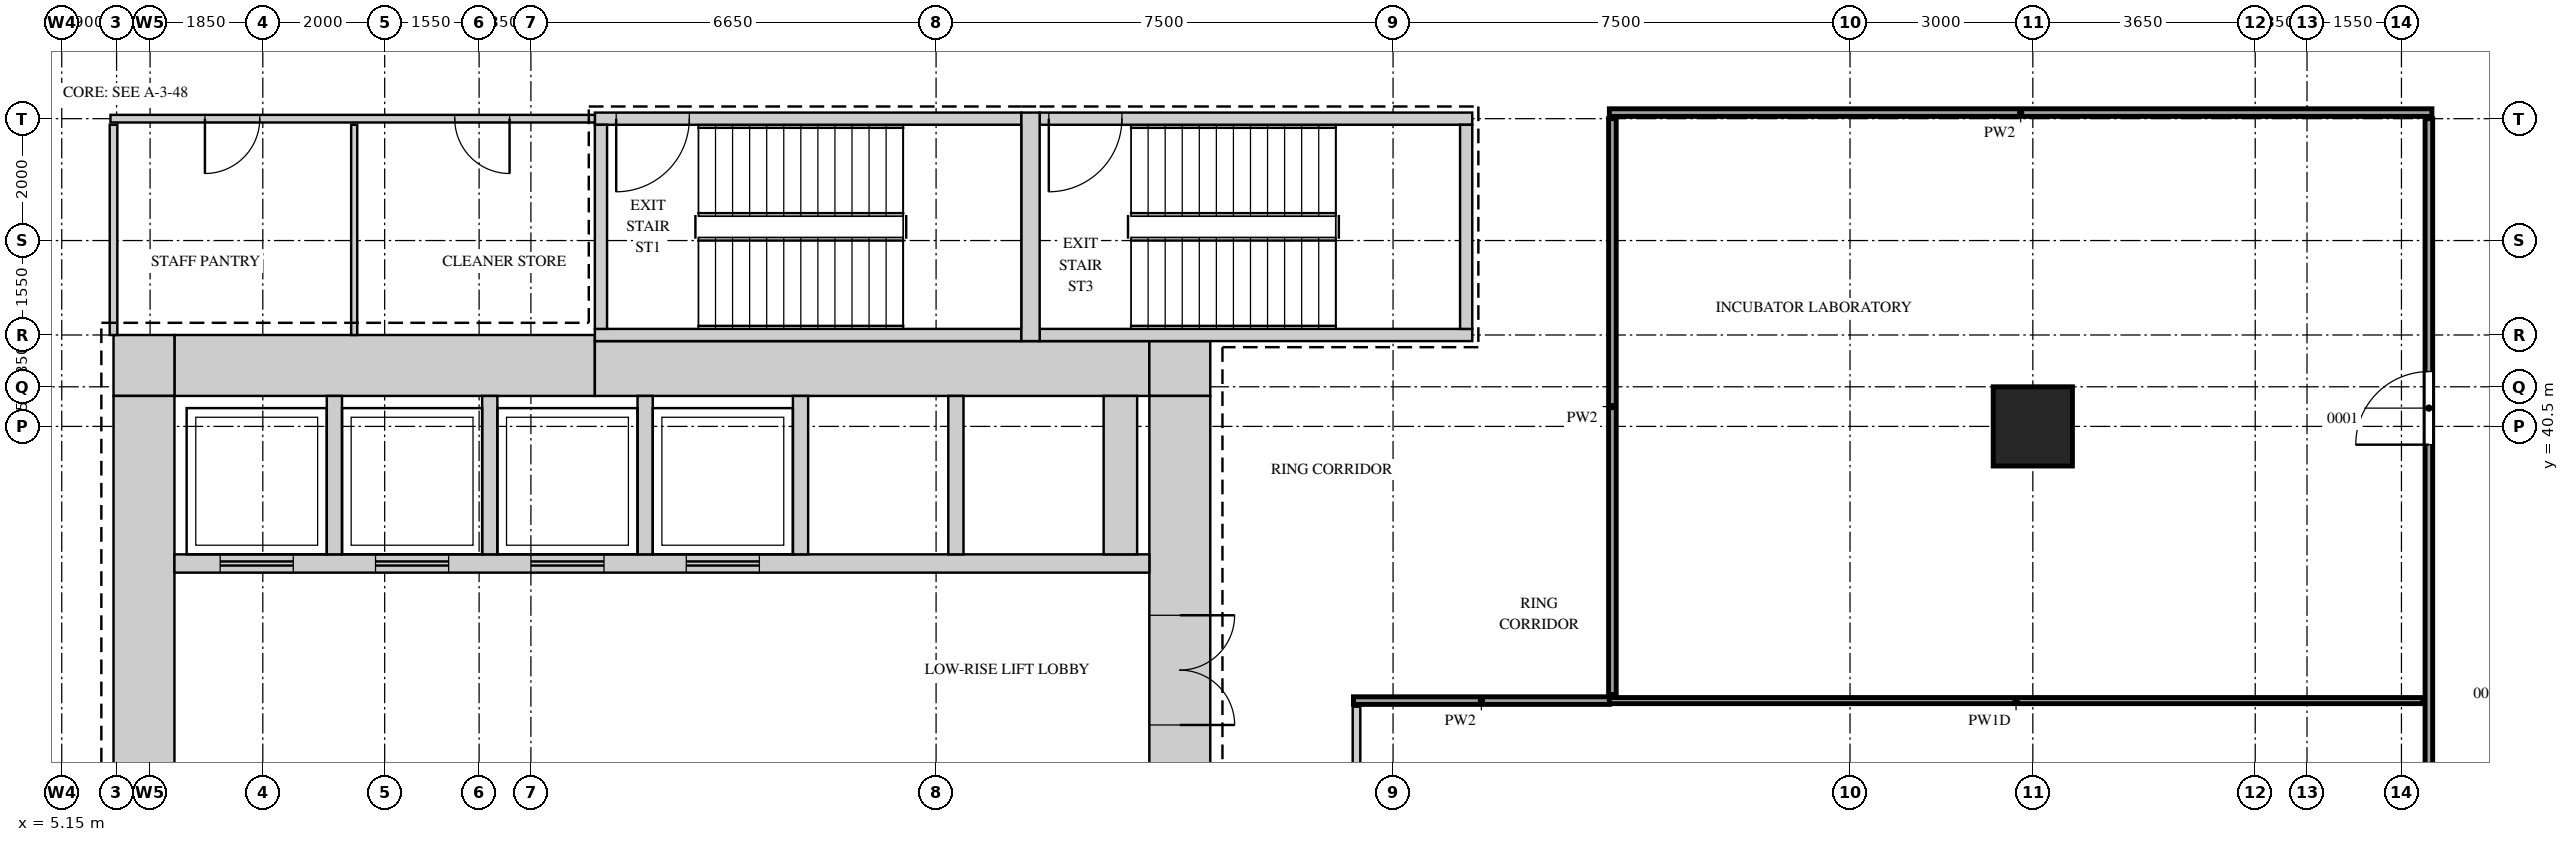
"""IFC4 building model, lengths in metres.
Left out: names, types, materials, properties, quantities, classifications, styles, units other than length and angle.
Written with IfcOpenShell. Run it as: python <this file> out.ifc"""

import sys

from ifc_helpers import new_model, si_unit, direction, frame, frame_2d, origin, origin_2d, place, context, subcontext, project, spatial, rectangle, extrude, source, transform, mapped, element, fill, save


model = new_model("IFC4")
c1 = context("Model", 3, precision=1e-05, world=origin(), true_north=direction((0.0, 1.0)))
c2 = subcontext(c1, "Body", "Model", "MODEL_VIEW")
j1 = project(units=[si_unit("LENGTHUNIT", "METRE"), si_unit("PLANEANGLEUNIT", "RADIAN")], contexts=[c1])
p1 = place(None, origin())
s1 = spatial("IfcSite", under=j1, at=p1, CompositionType="ELEMENT")
p2 = place(p1, origin())
s2 = spatial("IfcBuilding", under=s1, at=p2, CompositionType="ELEMENT")
p3 = place(p2, frame((0.0, 0.0, 154.3)))
s3 = spatial("IfcBuildingStorey", under=s2, at=p3, CompositionType="ELEMENT", Elevation=154.3)
m1 = source(origin(), c2, "Body", "SweptSolid", [
    extrude(rectangle(XDim=6.9, YDim=1.0, at=frame_2d((3.45, 0.0))), origin(), (0.0, 0.0, 1.0), 4.1),
])
p4 = place(p3, frame((7.0, 41.5, 0.0), z_axis=(0.0, 0.0, 1.0), x_axis=(1.0, 0.0, 0.0)))
e1 = element("IfcWall", 1, at=p4, inside=s3, PredefinedType="SHEAR", context=c2, shape_type="MappedRepresentation", body=[
    mapped(m1, transform((0.0, 0.0, 0.0))),
])
m2 = source(origin(), c2, "Body", "SweptSolid", [
    extrude(rectangle(XDim=9.1, YDim=0.9, at=frame_2d((4.55, 0.0))), origin(), (0.0, 0.0, 1.0), 4.1),
])
p5 = place(p3, frame((13.9, 41.45, 0.0), z_axis=(0.0, 0.0, 1.0), x_axis=(1.0, 0.0, 0.0)))
e2 = element("IfcWall", 2, at=p5, inside=s3, PredefinedType="SHEAR", context=c2, shape_type="MappedRepresentation", body=[
    mapped(m2, transform((0.0, 0.0, 0.0))),
])
m3 = source(origin(), c2, "Body", "SweptSolid", [
    extrude(rectangle(XDim=1.0, YDim=0.9, at=frame_2d((0.5, 0.0))), origin(), (0.0, 0.0, 1.0), 4.1),
])
p6 = place(p3, frame((23.0, 41.45, 0.0), z_axis=(0.0, 0.0, 1.0), x_axis=(1.0, 0.0, 0.0)))
e3 = element("IfcWall", 3, at=p6, inside=s3, PredefinedType="SHEAR", context=c2, shape_type="MappedRepresentation", body=[
    mapped(m3, transform((0.0, 0.0, 0.0))),
])
m4 = source(origin(), c2, "Body", "SweptSolid", [
    extrude(rectangle(XDim=1.0, YDim=1.0, at=frame_2d((0.5, 0.0))), origin(), (0.0, 0.0, 1.0), 4.1),
])
p7 = place(p3, frame((6.0, 41.5, 0.0), z_axis=(0.0, 0.0, 1.0), x_axis=(1.0, 0.0, 0.0)))
e4 = element("IfcWall", 4, at=p7, inside=s3, PredefinedType="SHEAR", context=c2, shape_type="MappedRepresentation", body=[
    mapped(m4, transform((0.0, 0.0, 0.0))),
])
m5 = source(origin(), c2, "Body", "SweptSolid", [
    extrude(rectangle(XDim=28.0, YDim=1.0, at=frame_2d((14.0, 0.0))), origin(), (0.0, 0.0, 1.0), 4.1),
])
p8 = place(p3, frame((23.5, 13.0, 0.0), z_axis=(0.0, 0.0, 1.0), x_axis=(0.0, 1.0, 0.0)))
e5 = element("IfcWall", 5, at=p8, inside=s3, PredefinedType="SHEAR", context=c2, shape_type="MappedRepresentation", body=[
    mapped(m5, transform((0.0, 0.0, 0.0))),
])
m6 = source(origin(), c2, "Body", "SweptSolid", [
    extrude(rectangle(XDim=1.8, YDim=2.1, at=frame_2d((0.9, 1.05))), frame((0.0, 0.51, 0.0), z_axis=(0.0, -1.0, 0.0), x_axis=(1.0, 0.0, 0.0)), (0.0, 0.0, 1.0), 1.02),
])
p9 = place(p8, frame((22.6, 0.0, 0.0)))
e6 = element("IfcOpeningElement", 6, at=p9, cuts=e5, PredefinedType="OPENING", context=c2, shape_type="MappedRepresentation", body=[
    mapped(m6, transform((0.0, 0.0, 0.0))),
])
m7 = source(origin(), c2, "Body", "SweptSolid", [
    extrude(rectangle(XDim=1.2, YDim=2.1, at=frame_2d((0.6, 1.05))), frame((0.0, 0.51, 0.0), z_axis=(0.0, -1.0, 0.0), x_axis=(1.0, 0.0, 0.0)), (0.0, 0.0, 1.0), 1.02),
])
p10 = place(p8, frame((14.6, 0.0, 0.0)))
e7 = element("IfcOpeningElement", 7, at=p10, cuts=e5, PredefinedType="OPENING", context=c2, shape_type="MappedRepresentation", body=[
    mapped(m7, transform((0.0, 0.0, 0.0))),
])
m8 = source(origin(), c2, "Body", "SweptSolid", [
    extrude(rectangle(XDim=0.9, YDim=2.1, at=frame_2d((0.45, 1.05))), frame((0.0, 0.51, 0.0), z_axis=(0.0, -1.0, 0.0), x_axis=(1.0, 0.0, 0.0)), (0.0, 0.0, 1.0), 1.02),
])
p11 = place(p8, frame((1.35, 0.0, 0.0)))
e8 = element("IfcOpeningElement", 8, at=p11, cuts=e5, PredefinedType="OPENING", context=c2, shape_type="MappedRepresentation", body=[
    mapped(m8, transform((0.0, 0.0, 0.0))),
])
p12 = place(p8, frame((6.2, 0.0, 0.0)))
e9 = element("IfcOpeningElement", 9, at=p12, cuts=e5, PredefinedType="OPENING", context=c2, shape_type="MappedRepresentation", body=[
    mapped(m8, transform((0.0, 0.0, 0.0))),
])
p13 = place(p3, frame((6.5, 13.0, 0.0), z_axis=(0.0, 0.0, 1.0), x_axis=(0.0, 1.0, 0.0)))
e10 = element("IfcWall", 10, at=p13, inside=s3, PredefinedType="SHEAR", context=c2, shape_type="MappedRepresentation", body=[
    mapped(m5, transform((0.0, 0.0, 0.0))),
])
m9 = source(origin(), c2, "Body", "SweptSolid", [
    extrude(rectangle(XDim=7.0, YDim=0.2, at=frame_2d((3.5, 0.0))), origin(), (0.0, 0.0, 1.0), 4.1),
])
p14 = place(p3, frame((13.9, 45.55, 0.0), z_axis=(0.0, 0.0, 1.0), x_axis=(1.0, 0.0, 0.0)))
e11 = element("IfcWall", 11, at=p14, inside=s3, PredefinedType="SHEAR", context=c2, shape_type="MappedRepresentation", body=[
    mapped(m9, transform((0.0, 0.0, 0.0))),
])
m10 = source(origin(), c2, "Body", "SweptSolid", [
    extrude(rectangle(XDim=1.2, YDim=2.1, at=frame_2d((0.6, 1.05))), frame((0.0, 0.11, 0.0), z_axis=(0.0, -1.0, 0.0), x_axis=(1.0, 0.0, 0.0)), (0.0, 0.0, 1.0), 0.22),
])
p15 = place(p14, frame((0.35, 0.0, 0.0)))
e12 = element("IfcOpeningElement", 12, at=p15, cuts=e11, PredefinedType="OPENING", context=c2, shape_type="MappedRepresentation", body=[
    mapped(m10, transform((0.0, 0.0, 0.0))),
])
p16 = place(p3, frame((13.9, 42.0, 0.0), z_axis=(0.0, 0.0, 1.0), x_axis=(1.0, 0.0, 0.0)))
e13 = element("IfcWall", 13, at=p16, inside=s3, PredefinedType="SHEAR", context=c2, shape_type="MappedRepresentation", body=[
    mapped(m9, transform((0.0, 0.0, 0.0))),
])
m11 = source(origin(), c2, "Body", "SweptSolid", [
    extrude(rectangle(XDim=7.1, YDim=0.2, at=frame_2d((3.55, 0.0))), origin(), (0.0, 0.0, 1.0), 4.1),
])
p17 = place(p3, frame((21.2, 45.55, 0.0), z_axis=(0.0, 0.0, 1.0), x_axis=(1.0, 0.0, 0.0)))
e14 = element("IfcWall", 14, at=p17, inside=s3, PredefinedType="SHEAR", context=c2, shape_type="MappedRepresentation", body=[
    mapped(m11, transform((0.0, 0.0, 0.0))),
])
p18 = place(p17, frame((0.15, 0.0, 0.0)))
e15 = element("IfcOpeningElement", 15, at=p18, cuts=e14, PredefinedType="OPENING", context=c2, shape_type="MappedRepresentation", body=[
    mapped(m10, transform((0.0, 0.0, 0.0))),
])
p19 = place(p3, frame((21.2, 42.0, 0.0), z_axis=(0.0, 0.0, 1.0), x_axis=(1.0, 0.0, 0.0)))
e16 = element("IfcWall", 16, at=p19, inside=s3, PredefinedType="SHEAR", context=c2, shape_type="MappedRepresentation", body=[
    mapped(m11, transform((0.0, 0.0, 0.0))),
])
m12 = source(origin(), c2, "Body", "SweptSolid", [
    extrude(rectangle(XDim=3.75, YDim=0.3, at=frame_2d((1.875, 0.0))), origin(), (0.0, 0.0, 1.0), 4.1),
])
p20 = place(p3, frame((21.05, 41.9, 0.0), z_axis=(0.0, 0.0, 1.0), x_axis=(0.0, 1.0, 0.0)))
e17 = element("IfcWall", 17, at=p20, inside=s3, PredefinedType="SHEAR", context=c2, shape_type="MappedRepresentation", body=[
    mapped(m12, transform((0.0, 0.0, 0.0))),
])
m13 = source(origin(), c2, "Body", "SweptSolid", [
    extrude(rectangle(XDim=3.35, YDim=0.2, at=frame_2d((1.675, 0.0))), origin(), (0.0, 0.0, 1.0), 4.1),
])
for number, where, z_axis, x_axis in (
    (18, (14.0, 42.1, 0.0), (0.0, 0.0, 1.0), (0.0, 1.0, 0.0)),
    (19, (28.2, 42.1, 0.0), (0.0, 0.0, 1.0), (0.0, 1.0, 0.0)),
):
    element("IfcWall", number, at=place(p3, frame(where, z_axis=z_axis, x_axis=x_axis)), inside=s3, PredefinedType="SHEAR", context=c2, shape_type="MappedRepresentation", body=[
        mapped(m13, transform((0.0, 0.0, 0.0))),
    ])
m14 = source(origin(), c2, "Body", "SweptSolid", [
    extrude(rectangle(XDim=16.0, YDim=0.3, at=frame_2d((8.0, 0.0))), origin(), (0.0, 0.0, 1.0), 4.1),
])
p21 = place(p3, frame((7.0, 38.25, 0.0), z_axis=(0.0, 0.0, 1.0), x_axis=(1.0, 0.0, 0.0)))
e20 = element("IfcWall", 20, at=p21, inside=s3, PredefinedType="STANDARD", context=c2, shape_type="MappedRepresentation", body=[
    mapped(m14, transform((0.0, 0.0, 0.0))),
])
m15 = source(origin(), c2, "Body", "SweptSolid", [
    extrude(rectangle(XDim=1.2, YDim=2.1, at=frame_2d((0.6, 1.05))), frame((0.0, 0.16, 0.0), z_axis=(0.0, -1.0, 0.0), x_axis=(1.0, 0.0, 0.0)), (0.0, 0.0, 1.0), 0.32),
])
p22 = place(p21, frame((0.75, 0.0, 0.0)))
e21 = element("IfcOpeningElement", 21, at=p22, cuts=e20, PredefinedType="OPENING", context=c2, shape_type="MappedRepresentation", body=[
    mapped(m15, transform((0.0, 0.0, 0.0))),
])
p23 = place(p21, frame((3.3, 0.0, 0.0)))
e22 = element("IfcOpeningElement", 22, at=p23, cuts=e20, PredefinedType="OPENING", context=c2, shape_type="MappedRepresentation", body=[
    mapped(m15, transform((0.0, 0.0, 0.0))),
])
p24 = place(p21, frame((5.85, 0.0, 0.0)))
e23 = element("IfcOpeningElement", 23, at=p24, cuts=e20, PredefinedType="OPENING", context=c2, shape_type="MappedRepresentation", body=[
    mapped(m15, transform((0.0, 0.0, 0.0))),
])
p25 = place(p21, frame((8.4, 0.0, 0.0)))
e24 = element("IfcOpeningElement", 24, at=p25, cuts=e20, PredefinedType="OPENING", context=c2, shape_type="MappedRepresentation", body=[
    mapped(m15, transform((0.0, 0.0, 0.0))),
])
m16 = source(origin(), c2, "Body", "SweptSolid", [
    extrude(rectangle(XDim=2.6, YDim=0.25, at=frame_2d((1.3, 0.0))), origin(), (0.0, 0.0, 1.0), 4.1),
])
for number, where, z_axis, x_axis in (
    (25, (9.625, 38.4, 0.0), (0.0, 0.0, 1.0), (0.0, 1.0, 0.0)),
    (26, (12.175, 38.4, 0.0), (0.0, 0.0, 1.0), (0.0, 1.0, 0.0)),
    (27, (14.725, 38.4, 0.0), (0.0, 0.0, 1.0), (0.0, 1.0, 0.0)),
    (28, (17.275, 38.4, 0.0), (0.0, 0.0, 1.0), (0.0, 1.0, 0.0)),
    (29, (19.825, 38.4, 0.0), (0.0, 0.0, 1.0), (0.0, 1.0, 0.0)),
):
    element("IfcWall", number, at=place(p3, frame(where, z_axis=z_axis, x_axis=x_axis)), inside=s3, PredefinedType="STANDARD", context=c2, shape_type="MappedRepresentation", body=[
        mapped(m16, transform((0.0, 0.0, 0.0))),
    ])
m17 = source(origin(), c2, "Body", "SweptSolid", [
    extrude(rectangle(XDim=2.6, YDim=0.55, at=frame_2d((1.3, 0.0))), origin(), (0.0, 0.0, 1.0), 4.1),
])
p26 = place(p3, frame((22.525, 38.4, 0.0), z_axis=(0.0, 0.0, 1.0), x_axis=(0.0, 1.0, 0.0)))
e30 = element("IfcWall", 30, at=p26, inside=s3, PredefinedType="STANDARD", context=c2, shape_type="MappedRepresentation", body=[
    mapped(m17, transform((0.0, 0.0, 0.0))),
])
m18 = source(origin(), c2, "Body", "SweptSolid", [
    extrude(rectangle(XDim=1.3, YDim=1.3, at=origin_2d()), origin(), (0.0, 0.0, 1.0), 4.4),
])
p27 = place(p3, frame((37.5, 40.5, 0.0), z_axis=(0.0, 0.0, 1.0), x_axis=(1.0, 0.0, 0.0)))
e31 = element("IfcColumn", 31, at=p27, inside=s3, PredefinedType="COLUMN", context=c2, shape_type="MappedRepresentation", body=[
    mapped(m18, transform((0.0, 0.0, 0.0))),
])
m19 = source(origin(), c2, "Body", "SweptSolid", [
    extrude(rectangle(XDim=23.2, YDim=0.125, at=frame_2d((11.6, 0.0))), origin(), (0.0, 0.0, 1.0), 4.2),
])
p28 = place(p3, frame((26.4, 12.7, 0.0), z_axis=(0.0, 0.0, 1.0), x_axis=(0.0, 1.0, 0.0)))
e32 = element("IfcWall", 32, at=p28, inside=s3, PredefinedType="PARTITIONING", context=c2, shape_type="MappedRepresentation", body=[
    mapped(m19, transform((0.0, 0.0, 0.0))),
])
m20 = source(origin(), c2, "Body", "SweptSolid", [
    extrude(rectangle(XDim=1.2, YDim=2.1, at=frame_2d((0.6, 1.05))), frame((0.0, 0.073, 0.0), z_axis=(0.0, -1.0, 0.0), x_axis=(1.0, 0.0, 0.0)), (0.0, 0.0, 1.0), 0.145),
])
p29 = place(p28, frame((6.65, 0.0, 0.0)))
e33 = element("IfcOpeningElement", 33, at=p29, cuts=e32, PredefinedType="OPENING", context=c2, shape_type="MappedRepresentation", body=[
    mapped(m20, transform((0.0, 0.0, 0.0))),
])
m21 = source(origin(), c2, "Body", "SweptSolid", [
    extrude(rectangle(XDim=32.85, YDim=0.125, at=frame_2d((16.425, 0.0))), origin(), (0.0, 0.0, 1.0), 4.2),
])
p30 = place(p3, frame((44.0, 12.7, 0.0), z_axis=(0.0, 0.0, 1.0), x_axis=(0.0, 1.0, 0.0)))
e34 = element("IfcWall", 34, at=p30, inside=s3, PredefinedType="PARTITIONING", context=c2, shape_type="MappedRepresentation", body=[
    mapped(m21, transform((0.0, 0.0, 0.0))),
])
p31 = place(p30, frame((18.2, 0.0, 0.0)))
e35 = element("IfcOpeningElement", 35, at=p31, cuts=e34, PredefinedType="OPENING", context=c2, shape_type="MappedRepresentation", body=[
    mapped(m20, transform((0.0, 0.0, 0.0))),
])
p32 = place(p30, frame((27.5, 0.0, 0.0)))
e36 = element("IfcOpeningElement", 36, at=p32, cuts=e34, PredefinedType="OPENING", context=c2, shape_type="MappedRepresentation", body=[
    mapped(m20, transform((0.0, 0.0, 0.0))),
])
m22 = source(origin(), c2, "Body", "SweptSolid", [
    extrude(rectangle(XDim=4.2, YDim=0.125, at=frame_2d((2.1, 0.0))), origin(), (0.0, 0.0, 1.0), 4.2),
])
p33 = place(p3, frame((26.35, 36.0, 0.0), z_axis=(0.0, 0.0, 1.0), x_axis=(1.0, 0.0, 0.0)))
e37 = element("IfcWall", 37, at=p33, inside=s3, PredefinedType="PARTITIONING", context=c2, shape_type="MappedRepresentation", body=[
    mapped(m22, transform((0.0, 0.0, 0.0))),
])
m23 = source(origin(), c2, "Body", "SweptSolid", [
    extrude(rectangle(XDim=13.35, YDim=0.1, at=frame_2d((6.675, 0.0))), origin(), (0.0, 0.0, 1.0), 4.2),
])
p34 = place(p3, frame((30.55, 36.0, 0.0), z_axis=(0.0, 0.0, 1.0), x_axis=(1.0, 0.0, 0.0)))
e38 = element("IfcWall", 38, at=p34, inside=s3, PredefinedType="PARTITIONING", context=c2, shape_type="MappedRepresentation", body=[
    mapped(m23, transform((0.0, 0.0, 0.0))),
])
m24 = source(origin(), c2, "Body", "SweptSolid", [
    extrude(rectangle(XDim=9.45, YDim=0.125, at=frame_2d((4.725, 0.0))), origin(), (0.0, 0.0, 1.0), 4.2),
])
p35 = place(p3, frame((30.6, 36.1, 0.0), z_axis=(0.0, 0.0, 1.0), x_axis=(0.0, 1.0, 0.0)))
e39 = element("IfcWall", 39, at=p35, inside=s3, PredefinedType="PARTITIONING", context=c2, shape_type="MappedRepresentation", body=[
    mapped(m24, transform((0.0, 0.0, 0.0))),
])
m25 = source(origin(), c2, "Body", "SweptSolid", [
    extrude(rectangle(XDim=3.45, YDim=0.125, at=frame_2d((1.725, 0.0))), origin(), (0.0, 0.0, 1.0), 4.2),
])
p36 = place(p3, frame((6.0, 42.0, 0.0), z_axis=(0.0, 0.0, 1.0), x_axis=(0.0, 1.0, 0.0)))
e40 = element("IfcWall", 40, at=p36, inside=s3, PredefinedType="PARTITIONING", context=c2, shape_type="MappedRepresentation", body=[
    mapped(m25, transform((0.0, 0.0, 0.0))),
])
m26 = source(origin(), c2, "Body", "SweptSolid", [
    extrude(rectangle(XDim=3.45, YDim=0.1, at=frame_2d((1.725, 0.0))), origin(), (0.0, 0.0, 1.0), 4.2),
])
p37 = place(p3, frame((9.95, 42.0, 0.0), z_axis=(0.0, 0.0, 1.0), x_axis=(0.0, 1.0, 0.0)))
e41 = element("IfcWall", 41, at=p37, inside=s3, PredefinedType="PARTITIONING", context=c2, shape_type="MappedRepresentation", body=[
    mapped(m26, transform((0.0, 0.0, 0.0))),
])
m27 = source(origin(), c2, "Body", "SweptSolid", [
    extrude(rectangle(XDim=7.95, YDim=0.125, at=frame_2d((3.975, 0.0))), origin(), (0.0, 0.0, 1.0), 4.2),
])
p38 = place(p3, frame((5.95, 45.55, 0.0), z_axis=(0.0, 0.0, 1.0), x_axis=(1.0, 0.0, 0.0)))
e42 = element("IfcWall", 42, at=p38, inside=s3, PredefinedType="PARTITIONING", context=c2, shape_type="MappedRepresentation", body=[
    mapped(m27, transform((0.0, 0.0, 0.0))),
])
m28 = source(origin(), c2, "Body", "SweptSolid", [
    extrude(rectangle(XDim=0.9, YDim=2.1, at=frame_2d((0.45, 1.05))), frame((0.0, 0.073, 0.0), z_axis=(0.0, -1.0, 0.0), x_axis=(1.0, 0.0, 0.0)), (0.0, 0.0, 1.0), 0.145),
])
p39 = place(p38, frame((1.55, 0.0, 0.0)))
e43 = element("IfcOpeningElement", 43, at=p39, cuts=e42, PredefinedType="OPENING", context=c2, shape_type="MappedRepresentation", body=[
    mapped(m28, transform((0.0, 0.0, 0.0))),
])
p40 = place(p38, frame((5.65, 0.0, 0.0)))
e44 = element("IfcOpeningElement", 44, at=p40, cuts=e42, PredefinedType="OPENING", context=c2, shape_type="MappedRepresentation", body=[
    mapped(m28, transform((0.0, 0.0, 0.0))),
])
m29 = source(origin(), c2, "Body", "SweptSolid", [
    extrude(rectangle(XDim=13.5, YDim=0.125, at=frame_2d((6.75, 0.0))), origin(), (0.0, 0.0, 1.0), 4.2),
])
p41 = place(p3, frame((30.55, 45.65, 0.0), z_axis=(0.0, 0.0, 1.0), x_axis=(1.0, 0.0, 0.0)))
e45 = element("IfcWall", 45, at=p41, inside=s3, PredefinedType="PARTITIONING", context=c2, shape_type="MappedRepresentation", body=[
    mapped(m29, transform((0.0, 0.0, 0.0))),
])
m30 = source(origin(), c2, "Body", "SweptSolid", [
    extrude(rectangle(XDim=1.8, YDim=2.1, at=frame_2d((0.9, 1.05))), frame((0.0, 0.45, 0.0), z_axis=(0.0, -1.0, 0.0), x_axis=(1.0, 0.0, 0.0)), (0.0, 0.0, 1.0), 0.9),
])
p42 = place(p9, origin())
e46 = element("IfcDoor", 46, at=p42, inside=s3, OperationType="DOUBLE_DOOR_SINGLE_SWING", PredefinedType="DOOR", context=c2, shape_type="MappedRepresentation", body=[
    mapped(m30, transform((0.0, 0.0, 0.0))),
])
fill(e6, e46)
m31 = source(origin(), c2, "Body", "SweptSolid", [
    extrude(rectangle(XDim=1.2, YDim=2.1, at=frame_2d((0.6, 1.05))), frame((0.0, 0.025, 0.0), z_axis=(0.0, -1.0, 0.0), x_axis=(1.0, 0.0, 0.0)), (0.0, 0.0, 1.0), 0.05),
])
p43 = place(p32, origin())
e47 = element("IfcDoor", 47, at=p43, inside=s3, OperationType="SINGLE_SWING_RIGHT", PredefinedType="DOOR", context=c2, shape_type="MappedRepresentation", body=[
    mapped(m31, transform((0.0, 0.0, 0.0))),
])
fill(e36, e47)
m32 = source(origin(), c2, "Body", "SweptSolid", [
    extrude(rectangle(XDim=0.9, YDim=2.1, at=frame_2d((0.45, 1.05))), frame((0.0, 0.025, 0.0), z_axis=(0.0, -1.0, 0.0), x_axis=(1.0, 0.0, 0.0)), (0.0, 0.0, 1.0), 0.05),
])
p44 = place(p39, origin())
e48 = element("IfcDoor", 48, at=p44, inside=s3, OperationType="SINGLE_SWING_LEFT", PredefinedType="DOOR", context=c2, shape_type="MappedRepresentation", body=[
    mapped(m32, transform((0.0, 0.0, 0.0))),
])
fill(e43, e48)
p45 = place(p40, origin())
e49 = element("IfcDoor", 49, at=p45, inside=s3, OperationType="SINGLE_SWING_RIGHT", PredefinedType="DOOR", context=c2, shape_type="MappedRepresentation", body=[
    mapped(m32, transform((0.0, 0.0, 0.0))),
])
fill(e44, e49)
p46 = place(p15, origin())
e50 = element("IfcDoor", 50, at=p46, inside=s3, OperationType="SINGLE_SWING_LEFT", PredefinedType="DOOR", context=c2, shape_type="MappedRepresentation", body=[
    mapped(m31, transform((0.0, 0.0, 0.0))),
])
fill(e12, e50)
p47 = place(p18, origin())
e51 = element("IfcDoor", 51, at=p47, inside=s3, OperationType="SINGLE_SWING_LEFT", PredefinedType="DOOR", context=c2, shape_type="MappedRepresentation", body=[
    mapped(m31, transform((0.0, 0.0, 0.0))),
])
fill(e15, e51)
p48 = place(p22, origin())
e52 = element("IfcDoor", 52, at=p48, inside=s3, OperationType="DOUBLE_DOOR_SLIDING", PredefinedType="DOOR", context=c2, shape_type="MappedRepresentation", body=[
    mapped(m31, transform((0.0, 0.0, 0.0))),
])
fill(e21, e52)
p49 = place(p23, origin())
e53 = element("IfcDoor", 53, at=p49, inside=s3, OperationType="DOUBLE_DOOR_SLIDING", PredefinedType="DOOR", context=c2, shape_type="MappedRepresentation", body=[
    mapped(m31, transform((0.0, 0.0, 0.0))),
])
fill(e22, e53)
p50 = place(p24, origin())
e54 = element("IfcDoor", 54, at=p50, inside=s3, OperationType="DOUBLE_DOOR_SLIDING", PredefinedType="DOOR", context=c2, shape_type="MappedRepresentation", body=[
    mapped(m31, transform((0.0, 0.0, 0.0))),
])
fill(e23, e54)
p51 = place(p25, origin())
e55 = element("IfcDoor", 55, at=p51, inside=s3, OperationType="DOUBLE_DOOR_SLIDING", PredefinedType="DOOR", context=c2, shape_type="MappedRepresentation", body=[
    mapped(m31, transform((0.0, 0.0, 0.0))),
])
fill(e24, e55)
save(model, sys.argv[1])
